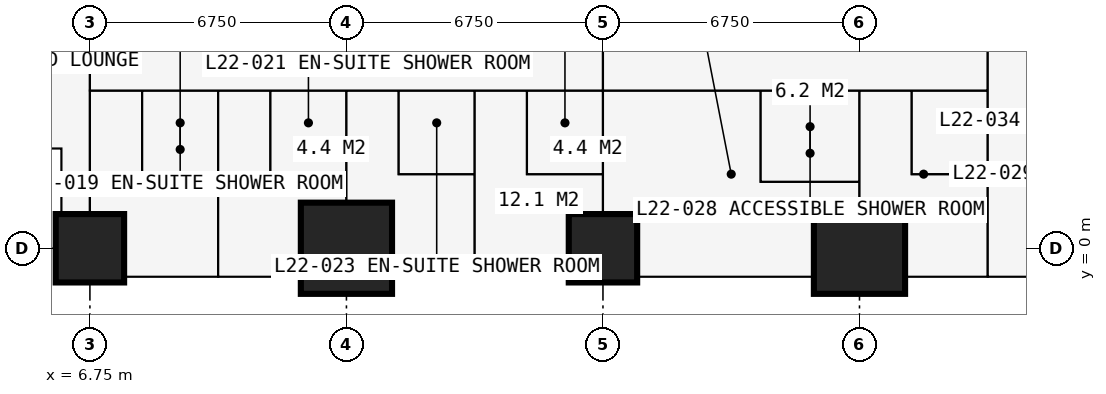
"""IFC4 building model, lengths in metres.
Left out: names, types, materials, properties, quantities, classifications, styles, units other than length and angle.
Written with IfcOpenShell. Run it as: python <this file> out.ifc"""

import sys

from ifc_helpers import new_model, si_unit, direction, frame, frame_2d, origin, origin_2d, place, context, subcontext, project, spatial, rectangle, extrude, element, fill, save


model = new_model("IFC4")
c1 = context("Model", 3, precision=1e-05, world=origin(), true_north=direction((0.0, 1.0)))
c2 = subcontext(c1, "Body", "Model", "MODEL_VIEW")
j1 = project(units=[si_unit("LENGTHUNIT", "METRE"), si_unit("PLANEANGLEUNIT", "RADIAN")], contexts=[c1])
p1 = place(None, origin())
s1 = spatial("IfcSite", under=j1, at=p1, CompositionType="ELEMENT")
p2 = place(p1, origin())
s2 = spatial("IfcBuilding", under=s1, at=p2, CompositionType="ELEMENT")
p3 = place(p2, frame((0.0, 0.0, 83.7)))
s3 = spatial("IfcBuildingStorey", under=s2, at=p3, CompositionType="ELEMENT", Elevation=83.7)
p4 = place(p3, frame((6.75, 0.0, 0.0), z_axis=(0.0, 0.0, 1.0), x_axis=(1.0, 0.0, 0.0)))
e1 = element("IfcColumn", 1, at=p4, inside=s3, PredefinedType="COLUMN", context=c2, shape_type="SweptSolid", body=[
    extrude(rectangle(XDim=1.8, YDim=1.8, at=origin_2d()), origin(), (0.0, 0.0, 1.0), 3.6),
])
p5 = place(p3, frame((13.5, 0.0, 0.0), z_axis=(0.0, 0.0, 1.0), x_axis=(1.0, 0.0, 0.0)))
e2 = element("IfcColumn", 2, at=p5, inside=s3, PredefinedType="COLUMN", context=c2, shape_type="SweptSolid", body=[
    extrude(rectangle(XDim=2.4, YDim=2.4, at=origin_2d()), origin(), (0.0, 0.0, 1.0), 3.6),
])
p6 = place(p3, frame((20.25, 0.0, 0.0), z_axis=(0.0, 0.0, 1.0), x_axis=(1.0, 0.0, 0.0)))
e3 = element("IfcColumn", 3, at=p6, inside=s3, PredefinedType="COLUMN", context=c2, shape_type="SweptSolid", body=[
    extrude(rectangle(XDim=1.8, YDim=1.8, at=origin_2d()), origin(), (0.0, 0.0, 1.0), 3.6),
])
p7 = place(p3, frame((27.0, 0.0, 0.0), z_axis=(0.0, 0.0, 1.0), x_axis=(1.0, 0.0, 0.0)))
e4 = element("IfcColumn", 4, at=p7, inside=s3, PredefinedType="COLUMN", context=c2, shape_type="SweptSolid", body=[
    extrude(rectangle(XDim=2.4, YDim=2.4, at=origin_2d()), origin(), (0.0, 0.0, 1.0), 3.6),
])
p8 = place(p3, frame((2.625, 2.625, 0.0), z_axis=(0.0, 0.0, 1.0), x_axis=(1.0, 0.0, 0.0)))
e5 = element("IfcWall", 5, at=p8, inside=s3, PredefinedType="SOLIDWALL", context=c2, shape_type="SweptSolid", body=[
    extrude(rectangle(XDim=3.375, YDim=0.3, at=frame_2d((1.688, 0.0))), origin(), (0.0, 0.0, 1.0), 3.375),
])
p9 = place(p8, frame((0.788, 0.0, 0.6)))
e6 = element("IfcOpeningElement", 6, at=p9, cuts=e5, PredefinedType="OPENING", context=c2, shape_type="SweptSolid", body=[
    extrude(rectangle(XDim=1.8, YDim=2.1, at=frame_2d((0.9, 1.05))), frame((0.0, 0.16, 0.0), z_axis=(0.0, -1.0, 0.0), x_axis=(1.0, 0.0, 0.0)), (0.0, 0.0, 1.0), 0.32),
])
p10 = place(p3, frame((6.0, 2.625, 0.0), z_axis=(0.0, 0.0, 1.0), x_axis=(0.0, -1.0, 0.0)))
e7 = element("IfcWall", 7, at=p10, inside=s3, PredefinedType="SOLIDWALL", context=c2, shape_type="SweptSolid", body=[
    extrude(rectangle(XDim=3.375, YDim=0.3, at=frame_2d((1.688, 0.0))), origin(), (0.0, 0.0, 1.0), 3.375),
])
p11 = place(p10, frame((0.343, 0.0, 0.9)))
e8 = element("IfcOpeningElement", 8, at=p11, cuts=e7, PredefinedType="OPENING", context=c2, shape_type="SweptSolid", body=[
    extrude(rectangle(XDim=1.2, YDim=1.8, at=frame_2d((0.6, 0.9))), frame((0.0, 0.16, 0.0), z_axis=(0.0, -1.0, 0.0), x_axis=(1.0, 0.0, 0.0)), (0.0, 0.0, 1.0), 0.32),
])
p12 = place(p3, frame((27.0, -0.75, 0.0), z_axis=(0.0, 0.0, 1.0), x_axis=(-1.0, 0.0, 0.0)))
e9 = element("IfcWall", 9, at=p12, inside=s3, PredefinedType="SOLIDWALL", context=c2, shape_type="SweptSolid", body=[
    extrude(rectangle(XDim=6.75, YDim=0.15, at=frame_2d((3.375, 0.0))), origin(), (0.0, 0.0, 1.0), 3.375),
])
p13 = place(p12, frame((1.262, 0.0, 0.0)))
e10 = element("IfcOpeningElement", 10, at=p13, cuts=e9, PredefinedType="OPENING", context=c2, shape_type="SweptSolid", body=[
    extrude(rectangle(XDim=1.0, YDim=2.2, at=frame_2d((0.5, 1.1))), frame((0.0, 0.085, 0.0), z_axis=(0.0, -1.0, 0.0), x_axis=(1.0, 0.0, 0.0)), (0.0, 0.0, 1.0), 0.17),
])
p14 = place(p12, frame((2.325, 0.0, 0.9)))
e11 = element("IfcOpeningElement", 11, at=p14, cuts=e9, PredefinedType="OPENING", context=c2, shape_type="SweptSolid", body=[
    extrude(rectangle(XDim=0.9, YDim=1.8, at=frame_2d((0.45, 0.9))), frame((0.0, 0.085, 0.0), z_axis=(0.0, -1.0, 0.0), x_axis=(1.0, 0.0, 0.0)), (0.0, 0.0, 1.0), 0.17),
])
p15 = place(p12, frame((4.788, 0.0, 0.0)))
e12 = element("IfcOpeningElement", 12, at=p15, cuts=e9, PredefinedType="OPENING", context=c2, shape_type="SweptSolid", body=[
    extrude(rectangle(XDim=1.0, YDim=2.2, at=frame_2d((0.5, 1.1))), frame((0.0, 0.085, 0.0), z_axis=(0.0, -1.0, 0.0), x_axis=(1.0, 0.0, 0.0)), (0.0, 0.0, 1.0), 0.17),
])
p16 = place(p12, frame((3.525, 0.0, 0.9)))
e13 = element("IfcOpeningElement", 13, at=p16, cuts=e9, PredefinedType="OPENING", context=c2, shape_type="SweptSolid", body=[
    extrude(rectangle(XDim=1.2, YDim=1.8, at=frame_2d((0.6, 0.9))), frame((0.0, 0.085, 0.0), z_axis=(0.0, -1.0, 0.0), x_axis=(1.0, 0.0, 0.0)), (0.0, 0.0, 1.0), 0.17),
])
p17 = place(p3, frame((23.625, -0.85, 0.0), z_axis=(0.0, 0.0, 1.0), x_axis=(0.0, -1.0, 0.0)))
e14 = element("IfcWall", 14, at=p17, inside=s3, PredefinedType="USERDEFINED", context=c2, shape_type="SweptSolid", body=[
    extrude(rectangle(XDim=2.2, YDim=1.0, at=frame_2d((1.1, 0.0))), origin(), (0.0, 0.0, 1.0), 0.9),
])
p18 = place(p3, frame((6.75, -0.734, 0.0), z_axis=(0.0, 0.0, 1.0), x_axis=(0.0, 1.0, 0.0)))
e15 = element("IfcWall", 15, at=p18, inside=s3, PredefinedType="PARTITIONING", context=c2, shape_type="SweptSolid", body=[
    extrude(rectangle(XDim=10.859, YDim=0.15, at=frame_2d((5.429, 0.0))), origin(), (0.0, 0.0, 1.0), 2.877),
])
p19 = place(p3, frame((6.75, 4.15, 0.0), z_axis=(0.0, 0.0, 1.0), x_axis=(1.0, 0.0, 0.0)))
e16 = element("IfcWall", 16, at=p19, inside=s3, PredefinedType="PARTITIONING", context=c2, shape_type="SweptSolid", body=[
    extrude(rectangle(XDim=23.625, YDim=0.1, at=frame_2d((11.812, 0.0))), origin(), (0.0, 0.0, 1.0), 3.375),
])
p20 = place(p19, frame((0.2, 0.0, 0.0)))
e17 = element("IfcOpeningElement", 17, at=p20, cuts=e16, PredefinedType="OPENING", context=c2, shape_type="SweptSolid", body=[
    extrude(rectangle(XDim=0.95, YDim=2.2, at=frame_2d((0.475, 1.1))), frame((0.0, 0.06, 0.0), z_axis=(0.0, -1.0, 0.0), x_axis=(1.0, 0.0, 0.0)), (0.0, 0.0, 1.0), 0.12),
])
p21 = place(p19, frame((3.625, 0.0, 0.0)))
e18 = element("IfcOpeningElement", 18, at=p21, cuts=e16, PredefinedType="OPENING", context=c2, shape_type="SweptSolid", body=[
    extrude(rectangle(XDim=0.95, YDim=2.2, at=frame_2d((0.475, 1.1))), frame((0.0, 0.06, 0.0), z_axis=(0.0, -1.0, 0.0), x_axis=(1.0, 0.0, 0.0)), (0.0, 0.0, 1.0), 0.12),
])
p22 = place(p19, frame((7.0, 0.0, 0.0)))
e19 = element("IfcOpeningElement", 19, at=p22, cuts=e16, PredefinedType="OPENING", context=c2, shape_type="SweptSolid", body=[
    extrude(rectangle(XDim=0.95, YDim=2.2, at=frame_2d((0.475, 1.1))), frame((0.0, 0.06, 0.0), z_axis=(0.0, -1.0, 0.0), x_axis=(1.0, 0.0, 0.0)), (0.0, 0.0, 1.0), 0.12),
])
p23 = place(p19, frame((10.375, 0.0, 0.0)))
e20 = element("IfcOpeningElement", 20, at=p23, cuts=e16, PredefinedType="OPENING", context=c2, shape_type="SweptSolid", body=[
    extrude(rectangle(XDim=0.95, YDim=2.2, at=frame_2d((0.475, 1.1))), frame((0.0, 0.06, 0.0), z_axis=(0.0, -1.0, 0.0), x_axis=(1.0, 0.0, 0.0)), (0.0, 0.0, 1.0), 0.12),
])
p24 = place(p19, frame((15.1, 0.0, 0.0)))
e21 = element("IfcOpeningElement", 21, at=p24, cuts=e16, PredefinedType="OPENING", context=c2, shape_type="SweptSolid", body=[
    extrude(rectangle(XDim=0.95, YDim=2.2, at=frame_2d((0.475, 1.1))), frame((0.0, 0.06, 0.0), z_axis=(0.0, -1.0, 0.0), x_axis=(1.0, 0.0, 0.0)), (0.0, 0.0, 1.0), 0.12),
])
p25 = place(p19, frame((20.5, 0.0, 0.0)))
e22 = element("IfcOpeningElement", 22, at=p25, cuts=e16, PredefinedType="OPENING", context=c2, shape_type="SweptSolid", body=[
    extrude(rectangle(XDim=0.95, YDim=2.2, at=frame_2d((0.475, 1.1))), frame((0.0, 0.06, 0.0), z_axis=(0.0, -1.0, 0.0), x_axis=(1.0, 0.0, 0.0)), (0.0, 0.0, 1.0), 0.12),
])
p26 = place(p3, frame((8.125, 1.95, 0.0), z_axis=(0.0, 0.0, 1.0), x_axis=(0.0, 1.0, 0.0)))
e23 = element("IfcWall", 23, at=p26, inside=s3, PredefinedType="PARTITIONING", context=c2, shape_type="SweptSolid", body=[
    extrude(rectangle(XDim=2.2, YDim=0.1, at=frame_2d((1.1, 0.0))), origin(), (0.0, 0.0, 1.0), 3.375),
])
p27 = place(p26, frame((0.65, 0.0, 0.0)))
e24 = element("IfcOpeningElement", 24, at=p27, cuts=e23, PredefinedType="OPENING", context=c2, shape_type="SweptSolid", body=[
    extrude(rectangle(XDim=0.9, YDim=2.2, at=frame_2d((0.45, 1.1))), frame((0.0, 0.06, 0.0), z_axis=(0.0, -1.0, 0.0), x_axis=(1.0, 0.0, 0.0)), (0.0, 0.0, 1.0), 0.12),
])
p28 = place(p3, frame((8.125, 1.95, 0.0), z_axis=(0.0, 0.0, 1.0), x_axis=(1.0, 0.0, 0.0)))
e25 = element("IfcWall", 25, at=p28, inside=s3, PredefinedType="PARTITIONING", context=c2, shape_type="SweptSolid", body=[
    extrude(rectangle(XDim=2.0, YDim=0.1, at=frame_2d((1.0, 0.0))), origin(), (0.0, 0.0, 1.0), 3.375),
])
p29 = place(p3, frame((10.125, -0.734, 0.0), z_axis=(0.0, 0.0, 1.0), x_axis=(0.0, 1.0, 0.0)))
e26 = element("IfcWall", 26, at=p29, inside=s3, PredefinedType="PARTITIONING", context=c2, shape_type="SweptSolid", body=[
    extrude(rectangle(XDim=4.884, YDim=0.175, at=frame_2d((2.442, 0.0))), origin(), (0.0, 0.0, 1.0), 3.375),
])
p30 = place(p3, frame((11.5, 1.95, 0.0), z_axis=(0.0, 0.0, 1.0), x_axis=(0.0, 1.0, 0.0)))
e27 = element("IfcWall", 27, at=p30, inside=s3, PredefinedType="PARTITIONING", context=c2, shape_type="SweptSolid", body=[
    extrude(rectangle(XDim=2.2, YDim=0.1, at=frame_2d((1.1, 0.0))), origin(), (0.0, 0.0, 1.0), 3.375),
])
p31 = place(p30, frame((0.65, 0.0, 0.0)))
e28 = element("IfcOpeningElement", 28, at=p31, cuts=e27, PredefinedType="OPENING", context=c2, shape_type="SweptSolid", body=[
    extrude(rectangle(XDim=0.9, YDim=2.2, at=frame_2d((0.45, 1.1))), frame((0.0, 0.06, 0.0), z_axis=(0.0, -1.0, 0.0), x_axis=(1.0, 0.0, 0.0)), (0.0, 0.0, 1.0), 0.12),
])
p32 = place(p3, frame((11.5, 1.95, 0.0), z_axis=(0.0, 0.0, 1.0), x_axis=(1.0, 0.0, 0.0)))
e29 = element("IfcWall", 29, at=p32, inside=s3, PredefinedType="PARTITIONING", context=c2, shape_type="SweptSolid", body=[
    extrude(rectangle(XDim=2.0, YDim=0.1, at=frame_2d((1.0, 0.0))), origin(), (0.0, 0.0, 1.0), 3.375),
])
p33 = place(p3, frame((13.5, -0.734, 0.0), z_axis=(0.0, 0.0, 1.0), x_axis=(0.0, 1.0, 0.0)))
e30 = element("IfcWall", 30, at=p33, inside=s3, PredefinedType="PARTITIONING", context=c2, shape_type="SweptSolid", body=[
    extrude(rectangle(XDim=4.884, YDim=0.175, at=frame_2d((2.442, 0.0))), origin(), (0.0, 0.0, 1.0), 2.61),
])
p34 = place(p3, frame((14.875, 1.95, 0.0), z_axis=(0.0, 0.0, 1.0), x_axis=(0.0, 1.0, 0.0)))
e31 = element("IfcWall", 31, at=p34, inside=s3, PredefinedType="PARTITIONING", context=c2, shape_type="SweptSolid", body=[
    extrude(rectangle(XDim=2.2, YDim=0.1, at=frame_2d((1.1, 0.0))), origin(), (0.0, 0.0, 1.0), 3.375),
])
p35 = place(p34, frame((0.65, 0.0, 0.0)))
e32 = element("IfcOpeningElement", 32, at=p35, cuts=e31, PredefinedType="OPENING", context=c2, shape_type="SweptSolid", body=[
    extrude(rectangle(XDim=0.9, YDim=2.2, at=frame_2d((0.45, 1.1))), frame((0.0, 0.06, 0.0), z_axis=(0.0, -1.0, 0.0), x_axis=(1.0, 0.0, 0.0)), (0.0, 0.0, 1.0), 0.12),
])
p36 = place(p3, frame((14.875, 1.95, 0.0), z_axis=(0.0, 0.0, 1.0), x_axis=(1.0, 0.0, 0.0)))
e33 = element("IfcWall", 33, at=p36, inside=s3, PredefinedType="PARTITIONING", context=c2, shape_type="SweptSolid", body=[
    extrude(rectangle(XDim=2.0, YDim=0.1, at=frame_2d((1.0, 0.0))), origin(), (0.0, 0.0, 1.0), 3.375),
])
p37 = place(p3, frame((16.875, -0.734, 0.0), z_axis=(0.0, 0.0, 1.0), x_axis=(0.0, 1.0, 0.0)))
e34 = element("IfcWall", 34, at=p37, inside=s3, PredefinedType="PARTITIONING", context=c2, shape_type="SweptSolid", body=[
    extrude(rectangle(XDim=4.884, YDim=0.175, at=frame_2d((2.442, 0.0))), origin(), (0.0, 0.0, 1.0), 3.375),
])
p38 = place(p3, frame((18.25, 1.95, 0.0), z_axis=(0.0, 0.0, 1.0), x_axis=(0.0, 1.0, 0.0)))
e35 = element("IfcWall", 35, at=p38, inside=s3, PredefinedType="PARTITIONING", context=c2, shape_type="SweptSolid", body=[
    extrude(rectangle(XDim=2.2, YDim=0.1, at=frame_2d((1.1, 0.0))), origin(), (0.0, 0.0, 1.0), 3.375),
])
p39 = place(p38, frame((0.65, 0.0, 0.0)))
e36 = element("IfcOpeningElement", 36, at=p39, cuts=e35, PredefinedType="OPENING", context=c2, shape_type="SweptSolid", body=[
    extrude(rectangle(XDim=0.9, YDim=2.2, at=frame_2d((0.45, 1.1))), frame((0.0, 0.06, 0.0), z_axis=(0.0, -1.0, 0.0), x_axis=(1.0, 0.0, 0.0)), (0.0, 0.0, 1.0), 0.12),
])
p40 = place(p3, frame((18.25, 1.95, 0.0), z_axis=(0.0, 0.0, 1.0), x_axis=(1.0, 0.0, 0.0)))
e37 = element("IfcWall", 37, at=p40, inside=s3, PredefinedType="PARTITIONING", context=c2, shape_type="SweptSolid", body=[
    extrude(rectangle(XDim=2.0, YDim=0.1, at=frame_2d((1.0, 0.0))), origin(), (0.0, 0.0, 1.0), 3.375),
])
p41 = place(p3, frame((20.25, -0.734, 0.0), z_axis=(0.0, 0.0, 1.0), x_axis=(0.0, 1.0, 0.0)))
e38 = element("IfcWall", 38, at=p41, inside=s3, PredefinedType="PARTITIONING", context=c2, shape_type="SweptSolid", body=[
    extrude(rectangle(XDim=12.034, YDim=0.15, at=frame_2d((6.017, 0.0))), origin(), (0.0, 0.0, 1.0), 2.61),
])
p42 = place(p3, frame((24.4, 1.75, 0.0), z_axis=(0.0, 0.0, 1.0), x_axis=(0.0, 1.0, 0.0)))
e39 = element("IfcWall", 39, at=p42, inside=s3, PredefinedType="PARTITIONING", context=c2, shape_type="SweptSolid", body=[
    extrude(rectangle(XDim=2.4, YDim=0.1, at=frame_2d((1.2, 0.0))), origin(), (0.0, 0.0, 1.0), 3.375),
])
p43 = place(p3, frame((24.4, 1.75, 0.0), z_axis=(0.0, 0.0, 1.0), x_axis=(1.0, 0.0, 0.0)))
e40 = element("IfcWall", 40, at=p43, inside=s3, PredefinedType="PARTITIONING", context=c2, shape_type="SweptSolid", body=[
    extrude(rectangle(XDim=2.6, YDim=0.1, at=frame_2d((1.3, 0.0))), origin(), (0.0, 0.0, 1.0), 3.375),
])
p44 = place(p43, frame((0.5, 0.0, 0.0)))
e41 = element("IfcOpeningElement", 41, at=p44, cuts=e40, PredefinedType="OPENING", context=c2, shape_type="SweptSolid", body=[
    extrude(rectangle(XDim=0.9, YDim=2.2, at=frame_2d((0.45, 1.1))), frame((0.0, 0.06, 0.0), z_axis=(0.0, -1.0, 0.0), x_axis=(1.0, 0.0, 0.0)), (0.0, 0.0, 1.0), 0.12),
])
p45 = place(p3, frame((27.0, -0.734, 0.0), z_axis=(0.0, 0.0, 1.0), x_axis=(0.0, 1.0, 0.0)))
e42 = element("IfcWall", 42, at=p45, inside=s3, PredefinedType="PARTITIONING", context=c2, shape_type="SweptSolid", body=[
    extrude(rectangle(XDim=4.884, YDim=0.175, at=frame_2d((2.442, 0.0))), origin(), (0.0, 0.0, 1.0), 2.877),
])
p46 = place(p3, frame((28.375, 1.95, 0.0), z_axis=(0.0, 0.0, 1.0), x_axis=(0.0, 1.0, 0.0)))
e43 = element("IfcWall", 43, at=p46, inside=s3, PredefinedType="PARTITIONING", context=c2, shape_type="SweptSolid", body=[
    extrude(rectangle(XDim=2.2, YDim=0.1, at=frame_2d((1.1, 0.0))), origin(), (0.0, 0.0, 1.0), 3.375),
])
p47 = place(p46, frame((0.65, 0.0, 0.0)))
e44 = element("IfcOpeningElement", 44, at=p47, cuts=e43, PredefinedType="OPENING", context=c2, shape_type="SweptSolid", body=[
    extrude(rectangle(XDim=0.9, YDim=2.2, at=frame_2d((0.45, 1.1))), frame((0.0, 0.06, 0.0), z_axis=(0.0, -1.0, 0.0), x_axis=(1.0, 0.0, 0.0)), (0.0, 0.0, 1.0), 0.12),
])
p48 = place(p3, frame((28.375, 1.95, 0.0), z_axis=(0.0, 0.0, 1.0), x_axis=(1.0, 0.0, 0.0)))
e45 = element("IfcWall", 45, at=p48, inside=s3, PredefinedType="PARTITIONING", context=c2, shape_type="SweptSolid", body=[
    extrude(rectangle(XDim=2.0, YDim=0.1, at=frame_2d((1.0, 0.0))), origin(), (0.0, 0.0, 1.0), 3.375),
])
p49 = place(p3, frame((30.375, -0.734, 0.0), z_axis=(0.0, 0.0, 1.0), x_axis=(0.0, 1.0, 0.0)))
e46 = element("IfcWall", 46, at=p49, inside=s3, PredefinedType="PARTITIONING", context=c2, shape_type="SweptSolid", body=[
    extrude(rectangle(XDim=12.034, YDim=0.15, at=frame_2d((6.017, 0.0))), origin(), (0.0, 0.0, 1.0), 3.375),
])
p50 = place(p49, frame((5.134, 0.0, 0.0)))
e47 = element("IfcOpeningElement", 47, at=p50, cuts=e46, PredefinedType="OPENING", context=c2, shape_type="SweptSolid", body=[
    extrude(rectangle(XDim=1.0, YDim=2.2, at=frame_2d((0.5, 1.1))), frame((0.0, 0.085, 0.0), z_axis=(0.0, -1.0, 0.0), x_axis=(1.0, 0.0, 0.0)), (0.0, 0.0, 1.0), 0.17),
])
p51 = place(p11, origin())
e48 = element("IfcWindow", 48, at=p51, inside=s3, PartitioningType="SINGLE_PANEL", PredefinedType="WINDOW", context=c2, shape_type="SweptSolid", body=[
    extrude(rectangle(XDim=1.2, YDim=1.8, at=frame_2d((0.6, 0.9))), frame((0.0, 0.03, 0.0), z_axis=(0.0, -1.0, 0.0), x_axis=(1.0, 0.0, 0.0)), (0.0, 0.0, 1.0), 0.06),
])
fill(e8, e48)
p52 = place(p13, origin())
e49 = element("IfcDoor", 49, at=p52, inside=s3, OperationType="SINGLE_SWING_LEFT", PredefinedType="DOOR", context=c2, shape_type="SweptSolid", body=[
    extrude(rectangle(XDim=1.0, YDim=2.2, at=frame_2d((0.5, 1.1))), frame((0.0, 0.025, 0.0), z_axis=(0.0, -1.0, 0.0), x_axis=(1.0, 0.0, 0.0)), (0.0, 0.0, 1.0), 0.05),
])
fill(e10, e49)
p53 = place(p14, origin())
e50 = element("IfcWindow", 50, at=p53, inside=s3, PartitioningType="SINGLE_PANEL", PredefinedType="WINDOW", context=c2, shape_type="SweptSolid", body=[
    extrude(rectangle(XDim=0.9, YDim=1.8, at=frame_2d((0.45, 0.9))), frame((0.0, 0.03, 0.0), z_axis=(0.0, -1.0, 0.0), x_axis=(1.0, 0.0, 0.0)), (0.0, 0.0, 1.0), 0.06),
])
fill(e11, e50)
p54 = place(p15, origin())
e51 = element("IfcDoor", 51, at=p54, inside=s3, OperationType="SINGLE_SWING_RIGHT", PredefinedType="DOOR", context=c2, shape_type="SweptSolid", body=[
    extrude(rectangle(XDim=1.0, YDim=2.2, at=frame_2d((0.5, 1.1))), frame((0.0, 0.025, 0.0), z_axis=(0.0, -1.0, 0.0), x_axis=(1.0, 0.0, 0.0)), (0.0, 0.0, 1.0), 0.05),
])
fill(e12, e51)
p55 = place(p16, origin())
e52 = element("IfcWindow", 52, at=p55, inside=s3, PartitioningType="SINGLE_PANEL", PredefinedType="WINDOW", context=c2, shape_type="SweptSolid", body=[
    extrude(rectangle(XDim=1.2, YDim=1.8, at=frame_2d((0.6, 0.9))), frame((0.0, 0.03, 0.0), z_axis=(0.0, -1.0, 0.0), x_axis=(1.0, 0.0, 0.0)), (0.0, 0.0, 1.0), 0.06),
])
fill(e13, e52)
p56 = place(p20, origin())
e53 = element("IfcDoor", 53, at=p56, inside=s3, OperationType="SINGLE_SWING_LEFT", PredefinedType="DOOR", context=c2, shape_type="SweptSolid", body=[
    extrude(rectangle(XDim=0.95, YDim=2.2, at=frame_2d((0.475, 1.1))), frame((0.0, 0.025, 0.0), z_axis=(0.0, -1.0, 0.0), x_axis=(1.0, 0.0, 0.0)), (0.0, 0.0, 1.0), 0.05),
])
fill(e17, e53)
p57 = place(p27, origin())
e54 = element("IfcDoor", 54, at=p57, inside=s3, OperationType="SINGLE_SWING_RIGHT", PredefinedType="DOOR", context=c2, shape_type="SweptSolid", body=[
    extrude(rectangle(XDim=0.9, YDim=2.2, at=frame_2d((0.45, 1.1))), frame((0.0, 0.025, 0.0), z_axis=(0.0, -1.0, 0.0), x_axis=(1.0, 0.0, 0.0)), (0.0, 0.0, 1.0), 0.05),
])
fill(e24, e54)
p58 = place(p21, origin())
e55 = element("IfcDoor", 55, at=p58, inside=s3, OperationType="SINGLE_SWING_LEFT", PredefinedType="DOOR", context=c2, shape_type="SweptSolid", body=[
    extrude(rectangle(XDim=0.95, YDim=2.2, at=frame_2d((0.475, 1.1))), frame((0.0, 0.025, 0.0), z_axis=(0.0, -1.0, 0.0), x_axis=(1.0, 0.0, 0.0)), (0.0, 0.0, 1.0), 0.05),
])
fill(e18, e55)
p59 = place(p31, origin())
e56 = element("IfcDoor", 56, at=p59, inside=s3, OperationType="SINGLE_SWING_RIGHT", PredefinedType="DOOR", context=c2, shape_type="SweptSolid", body=[
    extrude(rectangle(XDim=0.9, YDim=2.2, at=frame_2d((0.45, 1.1))), frame((0.0, 0.025, 0.0), z_axis=(0.0, -1.0, 0.0), x_axis=(1.0, 0.0, 0.0)), (0.0, 0.0, 1.0), 0.05),
])
fill(e28, e56)
p60 = place(p22, origin())
e57 = element("IfcDoor", 57, at=p60, inside=s3, OperationType="SINGLE_SWING_LEFT", PredefinedType="DOOR", context=c2, shape_type="SweptSolid", body=[
    extrude(rectangle(XDim=0.95, YDim=2.2, at=frame_2d((0.475, 1.1))), frame((0.0, 0.025, 0.0), z_axis=(0.0, -1.0, 0.0), x_axis=(1.0, 0.0, 0.0)), (0.0, 0.0, 1.0), 0.05),
])
fill(e19, e57)
p61 = place(p35, origin())
e58 = element("IfcDoor", 58, at=p61, inside=s3, OperationType="SINGLE_SWING_RIGHT", PredefinedType="DOOR", context=c2, shape_type="SweptSolid", body=[
    extrude(rectangle(XDim=0.9, YDim=2.2, at=frame_2d((0.45, 1.1))), frame((0.0, 0.025, 0.0), z_axis=(0.0, -1.0, 0.0), x_axis=(1.0, 0.0, 0.0)), (0.0, 0.0, 1.0), 0.05),
])
fill(e32, e58)
p62 = place(p23, origin())
e59 = element("IfcDoor", 59, at=p62, inside=s3, OperationType="SINGLE_SWING_LEFT", PredefinedType="DOOR", context=c2, shape_type="SweptSolid", body=[
    extrude(rectangle(XDim=0.95, YDim=2.2, at=frame_2d((0.475, 1.1))), frame((0.0, 0.025, 0.0), z_axis=(0.0, -1.0, 0.0), x_axis=(1.0, 0.0, 0.0)), (0.0, 0.0, 1.0), 0.05),
])
fill(e20, e59)
p63 = place(p39, origin())
e60 = element("IfcDoor", 60, at=p63, inside=s3, OperationType="SINGLE_SWING_RIGHT", PredefinedType="DOOR", context=c2, shape_type="SweptSolid", body=[
    extrude(rectangle(XDim=0.9, YDim=2.2, at=frame_2d((0.45, 1.1))), frame((0.0, 0.025, 0.0), z_axis=(0.0, -1.0, 0.0), x_axis=(1.0, 0.0, 0.0)), (0.0, 0.0, 1.0), 0.05),
])
fill(e36, e60)
p64 = place(p24, origin())
e61 = element("IfcDoor", 61, at=p64, inside=s3, OperationType="SINGLE_SWING_LEFT", PredefinedType="DOOR", context=c2, shape_type="SweptSolid", body=[
    extrude(rectangle(XDim=0.95, YDim=2.2, at=frame_2d((0.475, 1.1))), frame((0.0, 0.025, 0.0), z_axis=(0.0, -1.0, 0.0), x_axis=(1.0, 0.0, 0.0)), (0.0, 0.0, 1.0), 0.05),
])
fill(e21, e61)
p65 = place(p44, origin())
e62 = element("IfcDoor", 62, at=p65, inside=s3, OperationType="SINGLE_SWING_RIGHT", PredefinedType="DOOR", context=c2, shape_type="SweptSolid", body=[
    extrude(rectangle(XDim=0.9, YDim=2.2, at=frame_2d((0.45, 1.1))), frame((0.0, 0.025, 0.0), z_axis=(0.0, -1.0, 0.0), x_axis=(1.0, 0.0, 0.0)), (0.0, 0.0, 1.0), 0.05),
])
fill(e41, e62)
p66 = place(p25, origin())
e63 = element("IfcDoor", 63, at=p66, inside=s3, OperationType="SINGLE_SWING_LEFT", PredefinedType="DOOR", context=c2, shape_type="SweptSolid", body=[
    extrude(rectangle(XDim=0.95, YDim=2.2, at=frame_2d((0.475, 1.1))), frame((0.0, 0.025, 0.0), z_axis=(0.0, -1.0, 0.0), x_axis=(1.0, 0.0, 0.0)), (0.0, 0.0, 1.0), 0.05),
])
fill(e22, e63)
p67 = place(p47, origin())
e64 = element("IfcDoor", 64, at=p67, inside=s3, OperationType="SINGLE_SWING_RIGHT", PredefinedType="DOOR", context=c2, shape_type="SweptSolid", body=[
    extrude(rectangle(XDim=0.9, YDim=2.2, at=frame_2d((0.45, 1.1))), frame((0.0, 0.025, 0.0), z_axis=(0.0, -1.0, 0.0), x_axis=(1.0, 0.0, 0.0)), (0.0, 0.0, 1.0), 0.05),
])
fill(e44, e64)
p68 = place(p50, origin())
e65 = element("IfcDoor", 65, at=p68, inside=s3, OperationType="SINGLE_SWING_LEFT", PredefinedType="DOOR", context=c2, shape_type="SweptSolid", body=[
    extrude(rectangle(XDim=1.0, YDim=2.2, at=frame_2d((0.5, 1.1))), frame((0.0, 0.025, 0.0), z_axis=(0.0, -1.0, 0.0), x_axis=(1.0, 0.0, 0.0)), (0.0, 0.0, 1.0), 0.05),
])
fill(e47, e65)
save(model, sys.argv[1])
